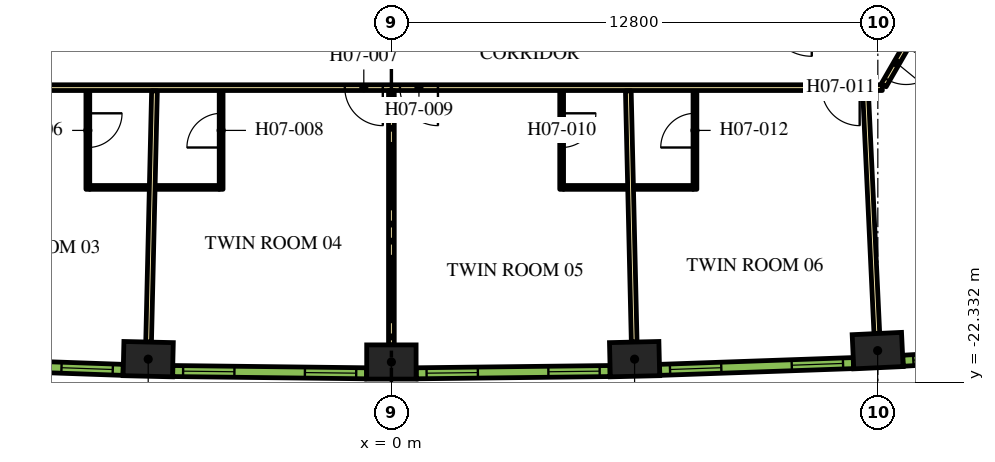
"""IFC4 building model, lengths in metres.
Left out: names, types, materials, properties, quantities, classifications, styles, units other than length and angle.
Written with IfcOpenShell. Run it as: python <this file> out.ifc"""

import sys

from ifc_helpers import new_model, si_unit, direction, frame, frame_2d, origin, origin_2d, place, context, subcontext, project, spatial, rectangle, extrude, element, fill, save


model = new_model("IFC4")
c1 = context("Model", 3, precision=1e-05, world=origin(), true_north=direction((0.0, 1.0)))
c2 = subcontext(c1, "Body", "Model", "MODEL_VIEW")
j1 = project(units=[si_unit("LENGTHUNIT", "METRE"), si_unit("PLANEANGLEUNIT", "RADIAN")], contexts=[c1])
p1 = place(None, origin())
s1 = spatial("IfcSite", under=j1, at=p1, CompositionType="ELEMENT")
p2 = place(p1, origin())
s2 = spatial("IfcBuilding", under=s1, at=p2, CompositionType="ELEMENT")
p3 = place(p2, frame((0.0, 0.0, 95.4)))
s3 = spatial("IfcBuildingStorey", under=s2, at=p3, CompositionType="ELEMENT", Elevation=95.4)
for number, where, z_axis, x_axis in (
    (1, (-6.399, -21.719, 0.0), (0.0, 0.0, 1.0), (1.0, -0.023, 0.0)),
    (2, (0.0, -21.794, 0.0), (0.0, 0.0, 1.0), (1.0, 0.0, 0.0)),
    (3, (6.399, -21.719, 0.0), (0.0, 0.0, 1.0), (1.0, 0.023, 0.0)),
    (4, (12.795, -21.494, 0.0), (0.0, 0.0, 1.0), (0.999, 0.047, 0.0)),
):
    element("IfcColumn", number, at=place(p3, frame(where, z_axis=z_axis, x_axis=x_axis)), inside=s3, PredefinedType="COLUMN", context=c2, shape_type="SweptSolid", body=[
        extrude(rectangle(XDim=1.3, YDim=0.9, at=origin_2d()), origin(), (0.0, 0.0, 1.0), 3.9),
    ])
p4 = place(p3, frame((12.918, -14.575, 0.0), z_axis=(0.0, 0.0, 1.0), x_axis=(-1.0, 0.0, 0.0)))
e5 = element("IfcWall", 5, at=p4, inside=s3, PredefinedType="PARTITIONING", context=c2, shape_type="SweptSolid", body=[
    extrude(rectangle(XDim=25.766, YDim=0.15, at=frame_2d((12.883, 0.0))), origin(), (0.0, 0.0, 1.0), 2.75),
])
p5 = place(p4, frame((24.24, 0.0, 0.0)))
e6 = element("IfcOpeningElement", 6, at=p5, cuts=e5, PredefinedType="OPENING", context=c2, shape_type="SweptSolid", body=[
    extrude(rectangle(XDim=1.0, YDim=2.1, at=frame_2d((0.5, 1.05))), frame((0.0, 0.085, 0.0), z_axis=(0.0, -1.0, 0.0), x_axis=(1.0, 0.0, 0.0)), (0.0, 0.0, 1.0), 0.17),
])
p6 = place(p4, frame((13.144, 0.0, 0.0)))
e7 = element("IfcOpeningElement", 7, at=p6, cuts=e5, PredefinedType="OPENING", context=c2, shape_type="SweptSolid", body=[
    extrude(rectangle(XDim=1.0, YDim=2.1, at=frame_2d((0.5, 1.05))), frame((0.0, 0.085, 0.0), z_axis=(0.0, -1.0, 0.0), x_axis=(1.0, 0.0, 0.0)), (0.0, 0.0, 1.0), 0.17),
])
p7 = place(p4, frame((11.693, 0.0, 0.0)))
e8 = element("IfcOpeningElement", 8, at=p7, cuts=e5, PredefinedType="OPENING", context=c2, shape_type="SweptSolid", body=[
    extrude(rectangle(XDim=1.0, YDim=2.1, at=frame_2d((0.5, 1.05))), frame((0.0, 0.085, 0.0), z_axis=(0.0, -1.0, 0.0), x_axis=(1.0, 0.0, 0.0)), (0.0, 0.0, 1.0), 0.17),
])
p8 = place(p4, frame((0.596, 0.0, 0.0)))
e9 = element("IfcOpeningElement", 9, at=p8, cuts=e5, PredefinedType="OPENING", context=c2, shape_type="SweptSolid", body=[
    extrude(rectangle(XDim=1.0, YDim=2.1, at=frame_2d((0.5, 1.05))), frame((0.0, 0.085, 0.0), z_axis=(0.0, -1.0, 0.0), x_axis=(1.0, 0.0, 0.0)), (0.0, 0.0, 1.0), 0.17),
])
p9 = place(p3, frame((15.587, -9.952, 0.0), z_axis=(0.0, 0.0, 1.0), x_axis=(-0.500016618951, -0.866015808616, 0.0)))
e10 = element("IfcWall", 10, at=p9, inside=s3, PredefinedType="PARTITIONING", context=c2, shape_type="SweptSolid", body=[
    extrude(rectangle(XDim=5.268, YDim=0.15, at=frame_2d((2.634, 0.0))), origin(), (0.0, 0.0, 1.0), 2.75),
])
p10 = place(p9, frame((4.088, 0.0, 0.0)))
e11 = element("IfcOpeningElement", 11, at=p10, cuts=e10, PredefinedType="OPENING", context=c2, shape_type="SweptSolid", body=[
    extrude(rectangle(XDim=1.0, YDim=2.1, at=frame_2d((0.5, 1.05))), frame((0.0, 0.085, 0.0), z_axis=(0.0, -1.0, 0.0), x_axis=(1.0, 0.0, 0.0)), (0.0, 0.0, 1.0), 0.17),
])
p11 = place(p3, frame((-6.389, -21.269, 0.0), z_axis=(0.0, 0.0, 1.0), x_axis=(0.023377429176, 0.999726710559, 0.0)))
e12 = element("IfcWall", 12, at=p11, inside=s3, PredefinedType="PARTITIONING", context=c2, shape_type="SweptSolid", body=[
    extrude(rectangle(XDim=6.611, YDim=0.15, at=frame_2d((3.305, 0.0))), origin(), (0.0, 0.0, 1.0), 2.75),
])
p12 = place(p3, frame((0.0, -21.344, 0.0), z_axis=(0.0, 0.0, 1.0), x_axis=(0.0, 1.0, 0.0)))
e13 = element("IfcWall", 13, at=p12, inside=s3, PredefinedType="PARTITIONING", context=c2, shape_type="SweptSolid", body=[
    extrude(rectangle(XDim=6.694, YDim=0.15, at=frame_2d((3.347, 0.0))), origin(), (0.0, 0.0, 1.0), 2.75),
])
p13 = place(p3, frame((6.389, -21.269, 0.0), z_axis=(0.0, 0.0, 1.0), x_axis=(-0.023377429176, 0.999726710559, 0.0)))
e14 = element("IfcWall", 14, at=p13, inside=s3, PredefinedType="PARTITIONING", context=c2, shape_type="SweptSolid", body=[
    extrude(rectangle(XDim=6.611, YDim=0.15, at=frame_2d((3.305, 0.0))), origin(), (0.0, 0.0, 1.0), 2.75),
])
p14 = place(p3, frame((12.774, -21.045, 0.0), z_axis=(0.0, 0.0, 1.0), x_axis=(-0.046750341626, 0.998906605023, 0.0)))
e15 = element("IfcWall", 15, at=p14, inside=s3, PredefinedType="PARTITIONING", context=c2, shape_type="SweptSolid", body=[
    extrude(rectangle(XDim=6.392, YDim=0.15, at=frame_2d((3.196, 0.0))), origin(), (0.0, 0.0, 1.0), 2.75),
])
p15 = place(p3, frame((-7.988, -14.65, 0.0), z_axis=(0.0, 0.0, 1.0), x_axis=(0.0, -1.0, 0.0)))
e16 = element("IfcWall", 16, at=p15, inside=s3, PredefinedType="PARTITIONING", context=c2, shape_type="SweptSolid", body=[
    extrude(rectangle(XDim=2.6, YDim=0.1, at=frame_2d((1.3, 0.0))), origin(), (0.0, 0.0, 1.0), 2.75),
])
p16 = place(p15, frame((0.6, 0.0, 0.0)))
e17 = element("IfcOpeningElement", 17, at=p16, cuts=e16, PredefinedType="OPENING", context=c2, shape_type="SweptSolid", body=[
    extrude(rectangle(XDim=0.9, YDim=2.1, at=frame_2d((0.45, 1.05))), frame((0.0, 0.06, 0.0), z_axis=(0.0, -1.0, 0.0), x_axis=(1.0, 0.0, 0.0)), (0.0, 0.0, 1.0), 0.12),
])
p17 = place(p3, frame((-7.938, -17.2, 0.0), z_axis=(0.0, 0.0, 1.0), x_axis=(1.0, 0.0, 0.0)))
e18 = element("IfcWall", 18, at=p17, inside=s3, PredefinedType="PARTITIONING", context=c2, shape_type="SweptSolid", body=[
    extrude(rectangle(XDim=1.56, YDim=0.1, at=frame_2d((0.78, 0.0))), origin(), (0.0, 0.0, 1.0), 2.75),
])
p18 = place(p3, frame((-4.48, -17.25, 0.0), z_axis=(0.0, 0.0, 1.0), x_axis=(0.0, 1.0, 0.0)))
e19 = element("IfcWall", 19, at=p18, inside=s3, PredefinedType="PARTITIONING", context=c2, shape_type="SweptSolid", body=[
    extrude(rectangle(XDim=2.6, YDim=0.1, at=frame_2d((1.3, 0.0))), origin(), (0.0, 0.0, 1.0), 2.75),
])
p19 = place(p18, frame((1.1, 0.0, 0.0)))
e20 = element("IfcOpeningElement", 20, at=p19, cuts=e19, PredefinedType="OPENING", context=c2, shape_type="SweptSolid", body=[
    extrude(rectangle(XDim=0.9, YDim=2.1, at=frame_2d((0.45, 1.05))), frame((0.0, 0.06, 0.0), z_axis=(0.0, -1.0, 0.0), x_axis=(1.0, 0.0, 0.0)), (0.0, 0.0, 1.0), 0.12),
])
p20 = place(p3, frame((-4.53, -17.2, 0.0), z_axis=(0.0, 0.0, 1.0), x_axis=(-1.0, 0.0, 0.0)))
e21 = element("IfcWall", 21, at=p20, inside=s3, PredefinedType="PARTITIONING", context=c2, shape_type="SweptSolid", body=[
    extrude(rectangle(XDim=1.68, YDim=0.1, at=frame_2d((0.84, 0.0))), origin(), (0.0, 0.0, 1.0), 2.75),
])
p21 = place(p3, frame((4.48, -14.65, 0.0), z_axis=(0.0, 0.0, 1.0), x_axis=(0.0, -1.0, 0.0)))
e22 = element("IfcWall", 22, at=p21, inside=s3, PredefinedType="PARTITIONING", context=c2, shape_type="SweptSolid", body=[
    extrude(rectangle(XDim=2.6, YDim=0.1, at=frame_2d((1.3, 0.0))), origin(), (0.0, 0.0, 1.0), 2.75),
])
p22 = place(p21, frame((0.6, 0.0, 0.0)))
e23 = element("IfcOpeningElement", 23, at=p22, cuts=e22, PredefinedType="OPENING", context=c2, shape_type="SweptSolid", body=[
    extrude(rectangle(XDim=0.9, YDim=2.1, at=frame_2d((0.45, 1.05))), frame((0.0, 0.06, 0.0), z_axis=(0.0, -1.0, 0.0), x_axis=(1.0, 0.0, 0.0)), (0.0, 0.0, 1.0), 0.12),
])
p23 = place(p3, frame((4.53, -17.2, 0.0), z_axis=(0.0, 0.0, 1.0), x_axis=(1.0, 0.0, 0.0)))
e24 = element("IfcWall", 24, at=p23, inside=s3, PredefinedType="PARTITIONING", context=c2, shape_type="SweptSolid", body=[
    extrude(rectangle(XDim=1.68, YDim=0.1, at=frame_2d((0.84, 0.0))), origin(), (0.0, 0.0, 1.0), 2.75),
])
p24 = place(p3, frame((7.988, -17.25, 0.0), z_axis=(0.0, 0.0, 1.0), x_axis=(0.0, 1.0, 0.0)))
e25 = element("IfcWall", 25, at=p24, inside=s3, PredefinedType="PARTITIONING", context=c2, shape_type="SweptSolid", body=[
    extrude(rectangle(XDim=2.6, YDim=0.1, at=frame_2d((1.3, 0.0))), origin(), (0.0, 0.0, 1.0), 2.75),
])
p25 = place(p24, frame((1.1, 0.0, 0.0)))
e26 = element("IfcOpeningElement", 26, at=p25, cuts=e25, PredefinedType="OPENING", context=c2, shape_type="SweptSolid", body=[
    extrude(rectangle(XDim=0.9, YDim=2.1, at=frame_2d((0.45, 1.05))), frame((0.0, 0.06, 0.0), z_axis=(0.0, -1.0, 0.0), x_axis=(1.0, 0.0, 0.0)), (0.0, 0.0, 1.0), 0.12),
])
p26 = place(p3, frame((7.938, -17.2, 0.0), z_axis=(0.0, 0.0, 1.0), x_axis=(-1.0, 0.0, 0.0)))
e27 = element("IfcWall", 27, at=p26, inside=s3, PredefinedType="PARTITIONING", context=c2, shape_type="SweptSolid", body=[
    extrude(rectangle(XDim=1.56, YDim=0.1, at=frame_2d((0.78, 0.0))), origin(), (0.0, 0.0, 1.0), 2.75),
])
p27 = place(p3, frame((-12.157, -21.822, 0.0), z_axis=(0.0, 0.0, 1.0), x_axis=(0.999385993957, -0.035037623812, 0.0)))
e28 = element("IfcWall", 28, at=p27, inside=s3, PredefinedType="SOLIDWALL", context=c2, shape_type="SweptSolid", body=[
    extrude(rectangle(XDim=5.101, YDim=0.29, at=frame_2d((2.55, 0.0))), origin(), (0.0, 0.0, 1.0), 3.65),
])
p28 = place(p27, frame((0.273, 0.0, 0.9)))
e29 = element("IfcOpeningElement", 29, at=p28, cuts=e28, PredefinedType="OPENING", context=c2, shape_type="SweptSolid", body=[
    extrude(rectangle(XDim=1.35, YDim=2.15, at=frame_2d((0.675, 1.075))), frame((0.0, 0.155, 0.0), z_axis=(0.0, -1.0, 0.0), x_axis=(1.0, 0.0, 0.0)), (0.0, 0.0, 1.0), 0.31),
])
p29 = place(p27, frame((3.478, 0.0, 0.9)))
e30 = element("IfcOpeningElement", 30, at=p29, cuts=e28, PredefinedType="OPENING", context=c2, shape_type="SweptSolid", body=[
    extrude(rectangle(XDim=1.35, YDim=2.15, at=frame_2d((0.675, 1.075))), frame((0.0, 0.155, 0.0), z_axis=(0.0, -1.0, 0.0), x_axis=(1.0, 0.0, 0.0)), (0.0, 0.0, 1.0), 0.31),
])
p30 = place(p3, frame((-5.753, -22.031, 0.0), z_axis=(0.0, 0.0, 1.0), x_axis=(0.999931786565, -0.011679992145, 0.0)))
e31 = element("IfcWall", 31, at=p30, inside=s3, PredefinedType="SOLIDWALL", context=c2, shape_type="SweptSolid", body=[
    extrude(rectangle(XDim=5.1, YDim=0.29, at=frame_2d((2.55, 0.0))), origin(), (0.0, 0.0, 1.0), 3.65),
])
p31 = place(p30, frame((0.272, 0.0, 0.9)))
e32 = element("IfcOpeningElement", 32, at=p31, cuts=e31, PredefinedType="OPENING", context=c2, shape_type="SweptSolid", body=[
    extrude(rectangle(XDim=1.35, YDim=2.15, at=frame_2d((0.675, 1.075))), frame((0.0, 0.155, 0.0), z_axis=(0.0, -1.0, 0.0), x_axis=(1.0, 0.0, 0.0)), (0.0, 0.0, 1.0), 0.31),
])
p32 = place(p30, frame((3.478, 0.0, 0.9)))
e33 = element("IfcOpeningElement", 33, at=p32, cuts=e31, PredefinedType="OPENING", context=c2, shape_type="SweptSolid", body=[
    extrude(rectangle(XDim=1.35, YDim=2.15, at=frame_2d((0.675, 1.075))), frame((0.0, 0.155, 0.0), z_axis=(0.0, -1.0, 0.0), x_axis=(1.0, 0.0, 0.0)), (0.0, 0.0, 1.0), 0.31),
])
p33 = place(p3, frame((0.653, -22.091, 0.0), z_axis=(0.0, 0.0, 1.0), x_axis=(0.999931786565, 0.011679992145, 0.0)))
e34 = element("IfcWall", 34, at=p33, inside=s3, PredefinedType="SOLIDWALL", context=c2, shape_type="SweptSolid", body=[
    extrude(rectangle(XDim=5.1, YDim=0.29, at=frame_2d((2.55, 0.0))), origin(), (0.0, 0.0, 1.0), 3.65),
])
p34 = place(p33, frame((0.273, 0.0, 0.9)))
e35 = element("IfcOpeningElement", 35, at=p34, cuts=e34, PredefinedType="OPENING", context=c2, shape_type="SweptSolid", body=[
    extrude(rectangle(XDim=1.35, YDim=2.15, at=frame_2d((0.675, 1.075))), frame((0.0, 0.155, 0.0), z_axis=(0.0, -1.0, 0.0), x_axis=(1.0, 0.0, 0.0)), (0.0, 0.0, 1.0), 0.31),
])
p35 = place(p33, frame((3.478, 0.0, 0.9)))
e36 = element("IfcOpeningElement", 36, at=p35, cuts=e34, PredefinedType="OPENING", context=c2, shape_type="SweptSolid", body=[
    extrude(rectangle(XDim=1.35, YDim=2.15, at=frame_2d((0.675, 1.075))), frame((0.0, 0.155, 0.0), z_axis=(0.0, -1.0, 0.0), x_axis=(1.0, 0.0, 0.0)), (0.0, 0.0, 1.0), 0.31),
])
p36 = place(p3, frame((7.059, -22.001, 0.0), z_axis=(0.0, 0.0, 1.0), x_axis=(0.999385993957, 0.035037623812, 0.0)))
e37 = element("IfcWall", 37, at=p36, inside=s3, PredefinedType="SOLIDWALL", context=c2, shape_type="SweptSolid", body=[
    extrude(rectangle(XDim=5.101, YDim=0.29, at=frame_2d((2.55, 0.0))), origin(), (0.0, 0.0, 1.0), 3.65),
])
p37 = place(p36, frame((0.273, 0.0, 0.9)))
e38 = element("IfcOpeningElement", 38, at=p37, cuts=e37, PredefinedType="OPENING", context=c2, shape_type="SweptSolid", body=[
    extrude(rectangle(XDim=1.35, YDim=2.15, at=frame_2d((0.675, 1.075))), frame((0.0, 0.155, 0.0), z_axis=(0.0, -1.0, 0.0), x_axis=(1.0, 0.0, 0.0)), (0.0, 0.0, 1.0), 0.31),
])
p38 = place(p36, frame((3.478, 0.0, 0.9)))
e39 = element("IfcOpeningElement", 39, at=p38, cuts=e37, PredefinedType="OPENING", context=c2, shape_type="SweptSolid", body=[
    extrude(rectangle(XDim=1.35, YDim=2.15, at=frame_2d((0.675, 1.075))), frame((0.0, 0.155, 0.0), z_axis=(0.0, -1.0, 0.0), x_axis=(1.0, 0.0, 0.0)), (0.0, 0.0, 1.0), 0.31),
])
p39 = place(p3, frame((13.462, -21.761, 0.0), z_axis=(0.0, 0.0, 1.0), x_axis=(0.998290511436, 0.058447025388, 0.0)))
e40 = element("IfcWall", 40, at=p39, inside=s3, PredefinedType="SOLIDWALL", context=c2, shape_type="SweptSolid", body=[
    extrude(rectangle(XDim=5.1, YDim=0.29, at=frame_2d((2.55, 0.0))), origin(), (0.0, 0.0, 1.0), 3.65),
])
p40 = place(p39, frame((0.272, 0.0, 0.9)))
e41 = element("IfcOpeningElement", 41, at=p40, cuts=e40, PredefinedType="OPENING", context=c2, shape_type="SweptSolid", body=[
    extrude(rectangle(XDim=1.35, YDim=2.15, at=frame_2d((0.675, 1.075))), frame((0.0, 0.155, 0.0), z_axis=(0.0, -1.0, 0.0), x_axis=(1.0, 0.0, 0.0)), (0.0, 0.0, 1.0), 0.31),
])
p41 = place(p39, frame((3.478, 0.0, 0.9)))
e42 = element("IfcOpeningElement", 42, at=p41, cuts=e40, PredefinedType="OPENING", context=c2, shape_type="SweptSolid", body=[
    extrude(rectangle(XDim=1.35, YDim=2.15, at=frame_2d((0.675, 1.075))), frame((0.0, 0.155, 0.0), z_axis=(0.0, -1.0, 0.0), x_axis=(1.0, 0.0, 0.0)), (0.0, 0.0, 1.0), 0.31),
])
p42 = place(p16, origin())
e43 = element("IfcDoor", 43, at=p42, inside=s3, OperationType="SINGLE_SWING_RIGHT", PredefinedType="DOOR", context=c2, shape_type="SweptSolid", body=[
    extrude(rectangle(XDim=0.9, YDim=2.1, at=frame_2d((0.45, 1.05))), frame((0.0, 0.025, 0.0), z_axis=(0.0, -1.0, 0.0), x_axis=(1.0, 0.0, 0.0)), (0.0, 0.0, 1.0), 0.05),
])
fill(e17, e43)
p43 = place(p6, origin())
e44 = element("IfcDoor", 44, at=p43, inside=s3, OperationType="SINGLE_SWING_LEFT", PredefinedType="DOOR", context=c2, shape_type="SweptSolid", body=[
    extrude(rectangle(XDim=1.0, YDim=2.1, at=frame_2d((0.5, 1.05))), frame((0.0, 0.025, 0.0), z_axis=(0.0, -1.0, 0.0), x_axis=(1.0, 0.0, 0.0)), (0.0, 0.0, 1.0), 0.05),
])
fill(e7, e44)
p44 = place(p19, origin())
e45 = element("IfcDoor", 45, at=p44, inside=s3, OperationType="SINGLE_SWING_LEFT", PredefinedType="DOOR", context=c2, shape_type="SweptSolid", body=[
    extrude(rectangle(XDim=0.9, YDim=2.1, at=frame_2d((0.45, 1.05))), frame((0.0, 0.025, 0.0), z_axis=(0.0, -1.0, 0.0), x_axis=(1.0, 0.0, 0.0)), (0.0, 0.0, 1.0), 0.05),
])
fill(e20, e45)
p45 = place(p7, origin())
e46 = element("IfcDoor", 46, at=p45, inside=s3, OperationType="SINGLE_SWING_RIGHT", PredefinedType="DOOR", context=c2, shape_type="SweptSolid", body=[
    extrude(rectangle(XDim=1.0, YDim=2.1, at=frame_2d((0.5, 1.05))), frame((0.0, 0.025, 0.0), z_axis=(0.0, -1.0, 0.0), x_axis=(1.0, 0.0, 0.0)), (0.0, 0.0, 1.0), 0.05),
])
fill(e8, e46)
p46 = place(p22, origin())
e47 = element("IfcDoor", 47, at=p46, inside=s3, OperationType="SINGLE_SWING_LEFT", PredefinedType="DOOR", context=c2, shape_type="SweptSolid", body=[
    extrude(rectangle(XDim=0.9, YDim=2.1, at=frame_2d((0.45, 1.05))), frame((0.0, 0.025, 0.0), z_axis=(0.0, -1.0, 0.0), x_axis=(1.0, 0.0, 0.0)), (0.0, 0.0, 1.0), 0.05),
])
fill(e23, e47)
p47 = place(p8, origin())
e48 = element("IfcDoor", 48, at=p47, inside=s3, OperationType="SINGLE_SWING_LEFT", PredefinedType="DOOR", context=c2, shape_type="SweptSolid", body=[
    extrude(rectangle(XDim=1.0, YDim=2.1, at=frame_2d((0.5, 1.05))), frame((0.0, 0.025, 0.0), z_axis=(0.0, -1.0, 0.0), x_axis=(1.0, 0.0, 0.0)), (0.0, 0.0, 1.0), 0.05),
])
fill(e9, e48)
p48 = place(p25, origin())
e49 = element("IfcDoor", 49, at=p48, inside=s3, OperationType="SINGLE_SWING_RIGHT", PredefinedType="DOOR", context=c2, shape_type="SweptSolid", body=[
    extrude(rectangle(XDim=0.9, YDim=2.1, at=frame_2d((0.45, 1.05))), frame((0.0, 0.025, 0.0), z_axis=(0.0, -1.0, 0.0), x_axis=(1.0, 0.0, 0.0)), (0.0, 0.0, 1.0), 0.05),
])
fill(e26, e49)
p49 = place(p10, origin())
e50 = element("IfcDoor", 50, at=p49, inside=s3, OperationType="SINGLE_SWING_RIGHT", PredefinedType="DOOR", context=c2, shape_type="SweptSolid", body=[
    extrude(rectangle(XDim=1.0, YDim=2.1, at=frame_2d((0.5, 1.05))), frame((0.0, 0.025, 0.0), z_axis=(0.0, -1.0, 0.0), x_axis=(1.0, 0.0, 0.0)), (0.0, 0.0, 1.0), 0.05),
])
fill(e11, e50)
p50 = place(p29, origin())
e51 = element("IfcWindow", 51, at=p50, inside=s3, PartitioningType="DOUBLE_PANEL_VERTICAL", PredefinedType="WINDOW", context=c2, shape_type="SweptSolid", body=[
    extrude(rectangle(XDim=1.35, YDim=2.15, at=frame_2d((0.675, 1.075))), frame((0.0, 0.015, 0.0), z_axis=(0.0, -1.0, 0.0), x_axis=(1.0, 0.0, 0.0)), (0.0, 0.0, 1.0), 0.06),
])
fill(e30, e51)
p51 = place(p31, origin())
e52 = element("IfcWindow", 52, at=p51, inside=s3, PartitioningType="DOUBLE_PANEL_VERTICAL", PredefinedType="WINDOW", context=c2, shape_type="SweptSolid", body=[
    extrude(rectangle(XDim=1.35, YDim=2.15, at=frame_2d((0.675, 1.075))), frame((0.0, 0.015, 0.0), z_axis=(0.0, -1.0, 0.0), x_axis=(1.0, 0.0, 0.0)), (0.0, 0.0, 1.0), 0.06),
])
fill(e32, e52)
p52 = place(p32, origin())
e53 = element("IfcWindow", 53, at=p52, inside=s3, PartitioningType="DOUBLE_PANEL_VERTICAL", PredefinedType="WINDOW", context=c2, shape_type="SweptSolid", body=[
    extrude(rectangle(XDim=1.35, YDim=2.15, at=frame_2d((0.675, 1.075))), frame((0.0, 0.015, 0.0), z_axis=(0.0, -1.0, 0.0), x_axis=(1.0, 0.0, 0.0)), (0.0, 0.0, 1.0), 0.06),
])
fill(e33, e53)
p53 = place(p34, origin())
e54 = element("IfcWindow", 54, at=p53, inside=s3, PartitioningType="DOUBLE_PANEL_VERTICAL", PredefinedType="WINDOW", context=c2, shape_type="SweptSolid", body=[
    extrude(rectangle(XDim=1.35, YDim=2.15, at=frame_2d((0.675, 1.075))), frame((0.0, 0.015, 0.0), z_axis=(0.0, -1.0, 0.0), x_axis=(1.0, 0.0, 0.0)), (0.0, 0.0, 1.0), 0.06),
])
fill(e35, e54)
p54 = place(p35, origin())
e55 = element("IfcWindow", 55, at=p54, inside=s3, PartitioningType="DOUBLE_PANEL_VERTICAL", PredefinedType="WINDOW", context=c2, shape_type="SweptSolid", body=[
    extrude(rectangle(XDim=1.35, YDim=2.15, at=frame_2d((0.675, 1.075))), frame((0.0, 0.015, 0.0), z_axis=(0.0, -1.0, 0.0), x_axis=(1.0, 0.0, 0.0)), (0.0, 0.0, 1.0), 0.06),
])
fill(e36, e55)
p55 = place(p37, origin())
e56 = element("IfcWindow", 56, at=p55, inside=s3, PartitioningType="DOUBLE_PANEL_VERTICAL", PredefinedType="WINDOW", context=c2, shape_type="SweptSolid", body=[
    extrude(rectangle(XDim=1.35, YDim=2.15, at=frame_2d((0.675, 1.075))), frame((0.0, 0.015, 0.0), z_axis=(0.0, -1.0, 0.0), x_axis=(1.0, 0.0, 0.0)), (0.0, 0.0, 1.0), 0.06),
])
fill(e38, e56)
p56 = place(p38, origin())
e57 = element("IfcWindow", 57, at=p56, inside=s3, PartitioningType="DOUBLE_PANEL_VERTICAL", PredefinedType="WINDOW", context=c2, shape_type="SweptSolid", body=[
    extrude(rectangle(XDim=1.35, YDim=2.15, at=frame_2d((0.675, 1.075))), frame((0.0, 0.015, 0.0), z_axis=(0.0, -1.0, 0.0), x_axis=(1.0, 0.0, 0.0)), (0.0, 0.0, 1.0), 0.06),
])
fill(e39, e57)
p57 = place(p40, origin())
e58 = element("IfcWindow", 58, at=p57, inside=s3, PartitioningType="DOUBLE_PANEL_VERTICAL", PredefinedType="WINDOW", context=c2, shape_type="SweptSolid", body=[
    extrude(rectangle(XDim=1.35, YDim=2.15, at=frame_2d((0.675, 1.075))), frame((0.0, 0.015, 0.0), z_axis=(0.0, -1.0, 0.0), x_axis=(1.0, 0.0, 0.0)), (0.0, 0.0, 1.0), 0.06),
])
fill(e41, e58)
save(model, sys.argv[1])
